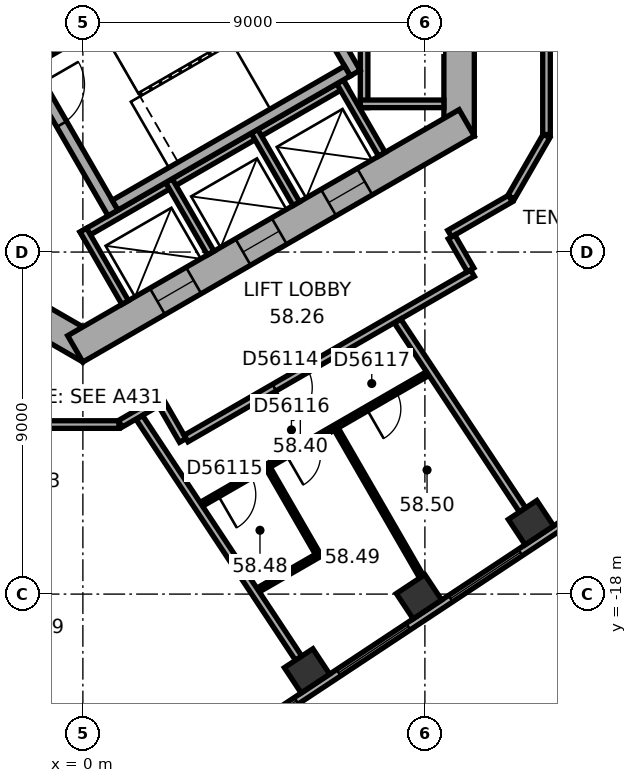
"""IFC4 building model, lengths in metres.
Left out: names, types, materials, properties, quantities, classifications, styles, units other than length and angle.
Written with IfcOpenShell. Run it as: python <this file> out.ifc"""

import sys

from ifc_helpers import new_model, si_unit, direction, frame, frame_2d, origin, origin_2d, place, context, subcontext, project, spatial, rectangle, extrude, element, fill, save


model = new_model("IFC4")
c1 = context("Model", 3, precision=1e-05, world=origin(), true_north=direction((0.0, 1.0)))
c2 = subcontext(c1, "Body", "Model", "MODEL_VIEW")
j1 = project(units=[si_unit("LENGTHUNIT", "METRE"), si_unit("PLANEANGLEUNIT", "RADIAN")], contexts=[c1])
p1 = place(None, origin())
s1 = spatial("IfcSite", under=j1, at=p1, CompositionType="ELEMENT")
p2 = place(p1, origin())
s2 = spatial("IfcBuilding", under=s1, at=p2, CompositionType="ELEMENT")
p3 = place(p2, frame((0.0, 0.0, 236.5)))
s3 = spatial("IfcBuildingStorey", under=s2, at=p3, CompositionType="ELEMENT", Elevation=236.5)
for number, where, z_axis, x_axis in (
    (1, (5.898, -20.021, 0.0), (0.0, 0.0, 1.0), (0.834, 0.552, 0.0)),
    (2, (8.844, -18.07, 0.0), (0.0, 0.0, 1.0), (0.834, 0.552, 0.0)),
    (3, (11.791, -16.12, 0.0), (0.0, 0.0, 1.0), (0.834, 0.552, 0.0)),
):
    element("IfcColumn", number, at=place(p3, frame(where, z_axis=z_axis, x_axis=x_axis)), inside=s3, PredefinedType="COLUMN", context=c2, shape_type="SweptSolid", body=[
        extrude(rectangle(XDim=0.9, YDim=0.8, at=origin_2d()), origin(), (0.0, 0.0, 1.0), 3.7),
    ])
p4 = place(p3, frame((9.9, -5.947, 0.0), z_axis=(0.0, 0.0, 1.0), x_axis=(0.0, 1.0, 0.0)))
e4 = element("IfcWall", 4, at=p4, inside=s3, PredefinedType="SHEAR", context=c2, shape_type="SweptSolid", body=[
    extrude(rectangle(XDim=11.894, YDim=0.8, at=frame_2d((5.947, 0.0))), origin(), (0.0, 0.0, 1.0), 3.7),
])
p5 = place(p4, frame((6.147, 0.0, 0.0)))
e5 = element("IfcOpeningElement", 5, at=p5, cuts=e4, PredefinedType="OPENING", context=c2, shape_type="SweptSolid", body=[
    extrude(rectangle(XDim=1.5, YDim=2.1, at=frame_2d((0.75, 1.05))), frame((0.0, 0.41, 0.0), z_axis=(0.0, -1.0, 0.0), x_axis=(1.0, 0.0, 0.0)), (0.0, 0.0, 1.0), 0.82),
])
p6 = place(p4, frame((2.997, 0.0, 0.0)))
e6 = element("IfcOpeningElement", 6, at=p6, cuts=e4, PredefinedType="OPENING", context=c2, shape_type="SweptSolid", body=[
    extrude(rectangle(XDim=0.9, YDim=2.1, at=frame_2d((0.45, 1.05))), frame((0.0, 0.41, 0.0), z_axis=(0.0, -1.0, 0.0), x_axis=(1.0, 0.0, 0.0)), (0.0, 0.0, 1.0), 0.82),
])
p7 = place(p3, frame((-10.1, -5.6, 0.0), z_axis=(0.0, 0.0, 1.0), x_axis=(0.866023897231, -0.500002609418, 0.0)))
e7 = element("IfcWall", 7, at=p7, inside=s3, PredefinedType="SHEAR", context=c2, shape_type="SweptSolid", body=[
    extrude(rectangle(XDim=11.894, YDim=0.8, at=frame_2d((5.947, 0.0))), origin(), (0.0, 0.0, 1.0), 3.7),
])
p8 = place(p7, frame((6.147, 0.0, 0.0)))
e8 = element("IfcOpeningElement", 8, at=p8, cuts=e7, PredefinedType="OPENING", context=c2, shape_type="SweptSolid", body=[
    extrude(rectangle(XDim=1.5, YDim=2.1, at=frame_2d((0.75, 1.05))), frame((0.0, 0.41, 0.0), z_axis=(0.0, -1.0, 0.0), x_axis=(1.0, 0.0, 0.0)), (0.0, 0.0, 1.0), 0.82),
])
p9 = place(p7, frame((1.597, 0.0, 0.0)))
e9 = element("IfcOpeningElement", 9, at=p9, cuts=e7, PredefinedType="OPENING", context=c2, shape_type="SweptSolid", body=[
    extrude(rectangle(XDim=1.1, YDim=2.1, at=frame_2d((0.55, 1.05))), frame((0.0, 0.41, 0.0), z_axis=(0.0, -1.0, 0.0), x_axis=(1.0, 0.0, 0.0)), (0.0, 0.0, 1.0), 0.82),
])
p10 = place(p7, frame((4.197, 0.0, 0.0)))
e10 = element("IfcOpeningElement", 10, at=p10, cuts=e7, PredefinedType="OPENING", context=c2, shape_type="SweptSolid", body=[
    extrude(rectangle(XDim=1.1, YDim=2.1, at=frame_2d((0.55, 1.05))), frame((0.0, 0.41, 0.0), z_axis=(0.0, -1.0, 0.0), x_axis=(1.0, 0.0, 0.0)), (0.0, 0.0, 1.0), 0.82),
])
p11 = place(p3, frame((-0.2, -11.547, 0.0), z_axis=(0.0, 0.0, 1.0), x_axis=(0.866023897231, 0.500002609418, 0.0)))
e11 = element("IfcWall", 11, at=p11, inside=s3, PredefinedType="SHEAR", context=c2, shape_type="SweptSolid", body=[
    extrude(rectangle(XDim=11.894, YDim=0.8, at=frame_2d((5.947, 0.0))), origin(), (0.0, 0.0, 1.0), 3.7),
])
p12 = place(p11, frame((2.497, 0.0, 0.0)))
e12 = element("IfcOpeningElement", 12, at=p12, cuts=e11, PredefinedType="OPENING", context=c2, shape_type="SweptSolid", body=[
    extrude(rectangle(XDim=1.1, YDim=2.1, at=frame_2d((0.55, 1.05))), frame((0.0, 0.41, 0.0), z_axis=(0.0, -1.0, 0.0), x_axis=(1.0, 0.0, 0.0)), (0.0, 0.0, 1.0), 0.82),
])
p13 = place(p11, frame((5.097, 0.0, 0.0)))
e13 = element("IfcOpeningElement", 13, at=p13, cuts=e11, PredefinedType="OPENING", context=c2, shape_type="SweptSolid", body=[
    extrude(rectangle(XDim=1.1, YDim=2.1, at=frame_2d((0.55, 1.05))), frame((0.0, 0.41, 0.0), z_axis=(0.0, -1.0, 0.0), x_axis=(1.0, 0.0, 0.0)), (0.0, 0.0, 1.0), 0.82),
])
p14 = place(p11, frame((7.697, 0.0, 0.0)))
e14 = element("IfcOpeningElement", 14, at=p14, cuts=e11, PredefinedType="OPENING", context=c2, shape_type="SweptSolid", body=[
    extrude(rectangle(XDim=1.1, YDim=2.1, at=frame_2d((0.55, 1.05))), frame((0.0, 0.41, 0.0), z_axis=(0.0, -1.0, 0.0), x_axis=(1.0, 0.0, 0.0)), (0.0, 0.0, 1.0), 0.82),
])
p15 = place(p3, frame((2.739, -22.711, 0.0), z_axis=(0.0, 0.0, 1.0), x_axis=(0.833885723098, 0.551937134838, 0.0)))
e15 = element("IfcWall", 15, at=p15, inside=s3, PredefinedType="STANDARD", context=c2, shape_type="SweptSolid", body=[
    extrude(rectangle(XDim=18.841, YDim=0.2, at=frame_2d((9.421, 0.0))), origin(), (0.0, 0.0, 1.0), 3.7),
])
p16 = place(p15, frame((1.252, 0.0, 0.9)))
e16 = element("IfcOpeningElement", 16, at=p16, cuts=e15, PredefinedType="OPENING", context=c2, shape_type="SweptSolid", body=[
    extrude(rectangle(XDim=2.2, YDim=2.0, at=frame_2d((1.1, 1.0))), frame((0.0, 0.11, 0.0), z_axis=(0.0, -1.0, 0.0), x_axis=(1.0, 0.0, 0.0)), (0.0, 0.0, 1.0), 0.22),
])
p17 = place(p15, frame((4.786, 0.0, 0.9)))
e17 = element("IfcOpeningElement", 17, at=p17, cuts=e15, PredefinedType="OPENING", context=c2, shape_type="SweptSolid", body=[
    extrude(rectangle(XDim=2.2, YDim=2.0, at=frame_2d((1.1, 1.0))), frame((0.0, 0.11, 0.0), z_axis=(0.0, -1.0, 0.0), x_axis=(1.0, 0.0, 0.0)), (0.0, 0.0, 1.0), 0.22),
])
p18 = place(p15, frame((8.32, 0.0, 0.9)))
e18 = element("IfcOpeningElement", 18, at=p18, cuts=e15, PredefinedType="OPENING", context=c2, shape_type="SweptSolid", body=[
    extrude(rectangle(XDim=2.2, YDim=2.0, at=frame_2d((1.1, 1.0))), frame((0.0, 0.11, 0.0), z_axis=(0.0, -1.0, 0.0), x_axis=(1.0, 0.0, 0.0)), (0.0, 0.0, 1.0), 0.22),
])
p19 = place(p15, frame((11.854, 0.0, 0.9)))
e19 = element("IfcOpeningElement", 19, at=p19, cuts=e15, PredefinedType="OPENING", context=c2, shape_type="SweptSolid", body=[
    extrude(rectangle(XDim=2.2, YDim=2.0, at=frame_2d((1.1, 1.0))), frame((0.0, 0.11, 0.0), z_axis=(0.0, -1.0, 0.0), x_axis=(1.0, 0.0, 0.0)), (0.0, 0.0, 1.0), 0.22),
])
p20 = place(p15, frame((15.387, 0.0, 0.9)))
e20 = element("IfcOpeningElement", 20, at=p20, cuts=e15, PredefinedType="OPENING", context=c2, shape_type="SweptSolid", body=[
    extrude(rectangle(XDim=2.2, YDim=2.0, at=frame_2d((1.1, 1.0))), frame((0.0, 0.11, 0.0), z_axis=(0.0, -1.0, 0.0), x_axis=(1.0, 0.0, 0.0)), (0.0, 0.0, 1.0), 0.22),
])
p21 = place(p3, frame((7.4, -5.2, 0.0), z_axis=(0.0, 0.0, 1.0), x_axis=(0.0, 1.0, 0.0)))
e21 = element("IfcWall", 21, at=p21, inside=s3, PredefinedType="PARTITIONING", context=c2, shape_type="SweptSolid", body=[
    extrude(rectangle(XDim=5.4, YDim=0.2, at=frame_2d((2.7, 0.0))), origin(), (0.0, 0.0, 1.0), 3.42),
])
p22 = place(p3, frame((7.3, -5.1, 0.0), z_axis=(0.0, 0.0, 1.0), x_axis=(1.0, 0.0, 0.0)))
e22 = element("IfcWall", 22, at=p22, inside=s3, PredefinedType="PARTITIONING", context=c2, shape_type="SweptSolid", body=[
    extrude(rectangle(XDim=2.2, YDim=0.2, at=frame_2d((1.1, 0.0))), origin(), (0.0, 0.0, 1.0), 3.42),
])
p23 = place(p3, frame((-0.024, -8.559, 0.0), z_axis=(0.0, 0.0, 1.0), x_axis=(0.866026010844, 0.49999894854, 0.0)))
e23 = element("IfcWall", 23, at=p23, inside=s3, PredefinedType="PARTITIONING", context=c2, shape_type="SweptSolid", body=[
    extrude(rectangle(XDim=8.0, YDim=0.2, at=frame_2d((4.0, 0.0))), origin(), (0.0, 0.0, 1.0), 3.42),
])
for number, where, z_axis, x_axis in (
    (24, (0.013, -8.422, 0.0), (0.0, 0.0, 1.0), (0.5, -0.866, 0.0)),
    (25, (2.264, -7.122, 0.0), (0.0, 0.0, 1.0), (0.5, -0.866, 0.0)),
    (26, (4.516, -5.822, 0.0), (0.0, 0.0, 1.0), (0.5, -0.866, 0.0)),
    (27, (6.768, -4.522, 0.0), (0.0, 0.0, 1.0), (0.5, -0.866, 0.0)),
):
    element("IfcWall", number, at=place(p3, frame(where, z_axis=z_axis, x_axis=x_axis)), inside=s3, PredefinedType="PARTITIONING", context=c2, shape_type="SweptSolid", body=[
        extrude(rectangle(XDim=2.2, YDim=0.2, at=frame_2d((1.1, 0.0))), origin(), (0.0, 0.0, 1.0), 3.42),
    ])
p24 = place(p3, frame((-1.558, -3.902, 0.0), z_axis=(0.0, 0.0, 1.0), x_axis=(0.499977259774, -0.866038532462, 0.0)))
e28 = element("IfcWall", 28, at=p24, inside=s3, PredefinedType="SHEAR", context=c2, shape_type="SweptSolid", body=[
    extrude(rectangle(XDim=4.7, YDim=0.3, at=frame_2d((2.35, 0.0))), origin(), (0.0, 0.0, 1.0), 3.42),
])
p25 = place(p24, frame((0.8, 0.0, 0.0)))
e29 = element("IfcOpeningElement", 29, at=p25, cuts=e28, PredefinedType="OPENING", context=c2, shape_type="SweptSolid", body=[
    extrude(rectangle(XDim=1.2, YDim=2.1, at=frame_2d((0.6, 1.05))), frame((0.0, 0.16, 0.0), z_axis=(0.0, -1.0, 0.0), x_axis=(1.0, 0.0, 0.0)), (0.0, 0.0, 1.0), 0.32),
])
p26 = place(p3, frame((4.816, -0.222, 0.0), z_axis=(0.0, 0.0, 1.0), x_axis=(0.499977259774, -0.866038532462, 0.0)))
e30 = element("IfcWall", 30, at=p26, inside=s3, PredefinedType="SHEAR", context=c2, shape_type="SweptSolid", body=[
    extrude(rectangle(XDim=4.7, YDim=0.3, at=frame_2d((2.35, 0.0))), origin(), (0.0, 0.0, 1.0), 3.42),
])
for number, where, z_axis, x_axis in (
    (31, (-1.353, -3.957, 0.0), (0.0, 0.0, 1.0), (0.866, 0.5, 0.0)),
    (32, (0.847, -7.767, 0.0), (0.0, 0.0, 1.0), (0.866, 0.5, 0.0)),
):
    element("IfcWall", number, at=place(p3, frame(where, z_axis=z_axis, x_axis=x_axis)), inside=s3, PredefinedType="SHEAR", context=c2, shape_type="SweptSolid", body=[
        extrude(rectangle(XDim=7.06, YDim=0.3, at=frame_2d((3.53, 0.0))), origin(), (0.0, 0.0, 1.0), 3.42),
    ])
p27 = place(p3, frame((-0.95, -13.539, 0.0), z_axis=(0.0, 0.0, 1.0), x_axis=(1.0, 0.0, 0.0)))
e33 = element("IfcWall", 33, at=p27, inside=s3, PredefinedType="PARTITIONING", context=c2, shape_type="SweptSolid", body=[
    extrude(rectangle(XDim=1.9, YDim=0.2, at=frame_2d((0.95, 0.0))), origin(), (0.0, 0.0, 1.0), 3.42),
])
p28 = place(p3, frame((0.985, -13.519, 0.0), z_axis=(0.0, 0.0, 1.0), x_axis=(0.866054082991, 0.499950322867, 0.0)))
e34 = element("IfcWall", 34, at=p28, inside=s3, PredefinedType="PARTITIONING", context=c2, shape_type="SweptSolid", body=[
    extrude(rectangle(XDim=1.206, YDim=0.2, at=frame_2d((0.603, 0.0))), origin(), (0.0, 0.0, 1.0), 3.42),
])
p29 = place(p3, frame((2.079, -13.003, 0.0), z_axis=(0.0, 0.0, 1.0), x_axis=(0.500074377092, -0.865982457891, 0.0)))
e35 = element("IfcWall", 35, at=p29, inside=s3, PredefinedType="PARTITIONING", context=c2, shape_type="SweptSolid", body=[
    extrude(rectangle(XDim=1.101, YDim=0.2, at=frame_2d((0.55, 0.0))), origin(), (0.0, 0.0, 1.0), 3.42),
])
p30 = place(p3, frame((2.716, -13.906, 0.0), z_axis=(0.0, 0.0, 1.0), x_axis=(0.866040290674, 0.499974214264, 0.0)))
e36 = element("IfcWall", 36, at=p30, inside=s3, PredefinedType="PARTITIONING", context=c2, shape_type="SweptSolid", body=[
    extrude(rectangle(XDim=8.702, YDim=0.2, at=frame_2d((4.351, 0.0))), origin(), (0.0, 0.0, 1.0), 3.42),
])
p31 = place(p30, frame((2.679, 0.0, 0.0)))
e37 = element("IfcOpeningElement", 37, at=p31, cuts=e36, PredefinedType="OPENING", context=c2, shape_type="SweptSolid", body=[
    extrude(rectangle(XDim=1.0, YDim=2.1, at=frame_2d((0.5, 1.05))), frame((0.0, 0.11, 0.0), z_axis=(0.0, -1.0, 0.0), x_axis=(1.0, 0.0, 0.0)), (0.0, 0.0, 1.0), 0.22),
])
p32 = place(p3, frame((3.117, -15.638, 0.0), z_axis=(0.0, 0.0, 1.0), x_axis=(0.866031365477, 0.499989673903, 0.0)))
e38 = element("IfcWall", 38, at=p32, inside=s3, PredefinedType="PARTITIONING", context=c2, shape_type="SweptSolid", body=[
    extrude(rectangle(XDim=6.881, YDim=0.12, at=frame_2d((3.44, 0.0))), origin(), (0.0, 0.0, 1.0), 3.42),
])
p33 = place(p32, frame((0.5, 0.0, 0.0)))
e39 = element("IfcOpeningElement", 39, at=p33, cuts=e38, PredefinedType="OPENING", context=c2, shape_type="SweptSolid", body=[
    extrude(rectangle(XDim=1.0, YDim=2.1, at=frame_2d((0.5, 1.05))), frame((0.0, 0.07, 0.0), z_axis=(0.0, -1.0, 0.0), x_axis=(1.0, 0.0, 0.0)), (0.0, 0.0, 1.0), 0.14),
])
p34 = place(p32, frame((2.583, 0.0, 0.0)))
e40 = element("IfcOpeningElement", 40, at=p34, cuts=e38, PredefinedType="OPENING", context=c2, shape_type="SweptSolid", body=[
    extrude(rectangle(XDim=0.9, YDim=2.1, at=frame_2d((0.45, 1.05))), frame((0.0, 0.07, 0.0), z_axis=(0.0, -1.0, 0.0), x_axis=(1.0, 0.0, 0.0)), (0.0, 0.0, 1.0), 0.14),
])
p35 = place(p32, frame((5.023, 0.0, 0.0)))
e41 = element("IfcOpeningElement", 41, at=p35, cuts=e38, PredefinedType="OPENING", context=c2, shape_type="SweptSolid", body=[
    extrude(rectangle(XDim=0.9, YDim=2.1, at=frame_2d((0.45, 1.05))), frame((0.0, 0.07, 0.0), z_axis=(0.0, -1.0, 0.0), x_axis=(1.0, 0.0, 0.0)), (0.0, 0.0, 1.0), 0.14),
])
p36 = place(p3, frame((4.61, -17.893, 0.0), z_axis=(0.0, 0.0, 1.0), x_axis=(0.866023842607, 0.500002704028, 0.0)))
e42 = element("IfcWall", 42, at=p36, inside=s3, PredefinedType="PARTITIONING", context=c2, shape_type="SweptSolid", body=[
    extrude(rectangle(XDim=1.835, YDim=0.12, at=frame_2d((0.917, 0.0))), origin(), (0.0, 0.0, 1.0), 3.42),
])
p37 = place(p3, frame((5.677, -19.687, 0.0), z_axis=(0.0, 0.0, 1.0), x_axis=(-0.551936619203, 0.833886064389, 0.0)))
e43 = element("IfcWall", 43, at=p37, inside=s3, PredefinedType="PARTITIONING", context=c2, shape_type="SweptSolid", body=[
    extrude(rectangle(XDim=7.592, YDim=0.2, at=frame_2d((3.796, 0.0))), origin(), (0.0, 0.0, 1.0), 3.42),
])
p38 = place(p3, frame((6.169, -16.924, 0.0), z_axis=(0.0, 0.0, 1.0), x_axis=(-0.500047388771, 0.865998042136, 0.0)))
e44 = element("IfcWall", 44, at=p38, inside=s3, PredefinedType="PARTITIONING", context=c2, shape_type="SweptSolid", body=[
    extrude(rectangle(XDim=2.58, YDim=0.12, at=frame_2d((1.29, 0.0))), origin(), (0.0, 0.0, 1.0), 3.42),
])
p39 = place(p3, frame((8.912, -17.545, 0.0), z_axis=(0.0, 0.0, 1.0), x_axis=(-0.500022113525, 0.866012636158, 0.0)))
e45 = element("IfcWall", 45, at=p39, inside=s3, PredefinedType="PARTITIONING", context=c2, shape_type="SweptSolid", body=[
    extrude(rectangle(XDim=4.49, YDim=0.12, at=frame_2d((2.245, 0.0))), origin(), (0.0, 0.0, 1.0), 2.87),
])
p40 = place(p3, frame((9.652, -8.515, 0.0), z_axis=(0.0, 0.0, 1.0), x_axis=(0.866020375458, 0.500008709215, 0.0)))
e46 = element("IfcWall", 46, at=p40, inside=s3, PredefinedType="PARTITIONING", context=c2, shape_type="SweptSolid", body=[
    extrude(rectangle(XDim=1.846, YDim=0.2, at=frame_2d((0.923, 0.0))), origin(), (0.0, 0.0, 1.0), 3.42),
])
p41 = place(p3, frame((10.202, -9.469, 0.0), z_axis=(0.0, 0.0, 1.0), x_axis=(-0.499968756647, 0.866043441391, 0.0)))
e47 = element("IfcWall", 47, at=p41, inside=s3, PredefinedType="PARTITIONING", context=c2, shape_type="SweptSolid", body=[
    extrude(rectangle(XDim=1.001, YDim=0.2, at=frame_2d((0.5, 0.0))), origin(), (0.0, 0.0, 1.0), 3.42),
])
p42 = place(p3, frame((11.27, -7.558, 0.0), z_axis=(0.0, 0.0, 1.0), x_axis=(0.499964847546, 0.866045698112, 0.0)))
e48 = element("IfcWall", 48, at=p42, inside=s3, PredefinedType="PARTITIONING", context=c2, shape_type="SweptSolid", body=[
    extrude(rectangle(XDim=1.86, YDim=0.2, at=frame_2d((0.93, 0.0))), origin(), (0.0, 0.0, 1.0), 3.42),
])
p43 = place(p3, frame((11.571, -15.786, 0.0), z_axis=(0.0, 0.0, 1.0), x_axis=(-0.551944861763, 0.833880608705, 0.0)))
e49 = element("IfcWall", 49, at=p43, inside=s3, PredefinedType="PARTITIONING", context=c2, shape_type="SweptSolid", body=[
    extrude(rectangle(XDim=5.957, YDim=0.2, at=frame_2d((2.979, 0.0))), origin(), (0.0, 0.0, 1.0), 3.42),
])
p44 = place(p3, frame((12.2, -5.907, 0.0), z_axis=(0.0, 0.0, 1.0), x_axis=(0.0, 1.0, 0.0)))
e50 = element("IfcWall", 50, at=p44, inside=s3, PredefinedType="PARTITIONING", context=c2, shape_type="SweptSolid", body=[
    extrude(rectangle(XDim=4.971, YDim=0.2, at=frame_2d((2.486, 0.0))), origin(), (0.0, 0.0, 1.0), 3.42),
])
p45 = place(p16, origin())
e51 = element("IfcWindow", 51, at=p45, inside=s3, PartitioningType="SINGLE_PANEL", PredefinedType="WINDOW", context=c2, shape_type="SweptSolid", body=[
    extrude(rectangle(XDim=2.2, YDim=2.0, at=frame_2d((1.1, 1.0))), frame((0.0, 0.03, 0.0), z_axis=(0.0, -1.0, 0.0), x_axis=(1.0, 0.0, 0.0)), (0.0, 0.0, 1.0), 0.06),
])
fill(e16, e51)
p46 = place(p17, origin())
e52 = element("IfcWindow", 52, at=p46, inside=s3, PartitioningType="SINGLE_PANEL", PredefinedType="WINDOW", context=c2, shape_type="SweptSolid", body=[
    extrude(rectangle(XDim=2.2, YDim=2.0, at=frame_2d((1.1, 1.0))), frame((0.0, 0.03, 0.0), z_axis=(0.0, -1.0, 0.0), x_axis=(1.0, 0.0, 0.0)), (0.0, 0.0, 1.0), 0.06),
])
fill(e17, e52)
p47 = place(p18, origin())
e53 = element("IfcWindow", 53, at=p47, inside=s3, PartitioningType="SINGLE_PANEL", PredefinedType="WINDOW", context=c2, shape_type="SweptSolid", body=[
    extrude(rectangle(XDim=2.2, YDim=2.0, at=frame_2d((1.1, 1.0))), frame((0.0, 0.03, 0.0), z_axis=(0.0, -1.0, 0.0), x_axis=(1.0, 0.0, 0.0)), (0.0, 0.0, 1.0), 0.06),
])
fill(e18, e53)
p48 = place(p25, origin())
e54 = element("IfcDoor", 54, at=p48, inside=s3, OperationType="SINGLE_SWING_RIGHT", PredefinedType="DOOR", context=c2, shape_type="SweptSolid", body=[
    extrude(rectangle(XDim=1.2, YDim=2.1, at=frame_2d((0.6, 1.05))), frame((0.0, 0.025, 0.0), z_axis=(0.0, -1.0, 0.0), x_axis=(1.0, 0.0, 0.0)), (0.0, 0.0, 1.0), 0.05),
])
fill(e29, e54)
p49 = place(p12, origin())
e55 = element("IfcDoor", 55, at=p49, inside=s3, OperationType="DOUBLE_DOOR_SLIDING", PredefinedType="DOOR", context=c2, shape_type="SweptSolid", body=[
    extrude(rectangle(XDim=1.1, YDim=2.1, at=frame_2d((0.55, 1.05))), frame((0.0, 0.025, 0.0), z_axis=(0.0, -1.0, 0.0), x_axis=(1.0, 0.0, 0.0)), (0.0, 0.0, 1.0), 0.05),
])
fill(e12, e55)
p50 = place(p13, origin())
e56 = element("IfcDoor", 56, at=p50, inside=s3, OperationType="DOUBLE_DOOR_SLIDING", PredefinedType="DOOR", context=c2, shape_type="SweptSolid", body=[
    extrude(rectangle(XDim=1.1, YDim=2.1, at=frame_2d((0.55, 1.05))), frame((0.0, 0.025, 0.0), z_axis=(0.0, -1.0, 0.0), x_axis=(1.0, 0.0, 0.0)), (0.0, 0.0, 1.0), 0.05),
])
fill(e13, e56)
p51 = place(p14, origin())
e57 = element("IfcDoor", 57, at=p51, inside=s3, OperationType="DOUBLE_DOOR_SLIDING", PredefinedType="DOOR", context=c2, shape_type="SweptSolid", body=[
    extrude(rectangle(XDim=1.1, YDim=2.1, at=frame_2d((0.55, 1.05))), frame((0.0, 0.025, 0.0), z_axis=(0.0, -1.0, 0.0), x_axis=(1.0, 0.0, 0.0)), (0.0, 0.0, 1.0), 0.05),
])
fill(e14, e57)
p52 = place(p31, origin())
e58 = element("IfcDoor", 58, at=p52, inside=s3, OperationType="SINGLE_SWING_LEFT", PredefinedType="DOOR", context=c2, shape_type="SweptSolid", body=[
    extrude(rectangle(XDim=1.0, YDim=2.1, at=frame_2d((0.5, 1.05))), frame((0.0, 0.025, 0.0), z_axis=(0.0, -1.0, 0.0), x_axis=(1.0, 0.0, 0.0)), (0.0, 0.0, 1.0), 0.05),
])
fill(e37, e58)
p53 = place(p33, origin())
e59 = element("IfcDoor", 59, at=p53, inside=s3, OperationType="SINGLE_SWING_LEFT", PredefinedType="DOOR", context=c2, shape_type="SweptSolid", body=[
    extrude(rectangle(XDim=1.0, YDim=2.1, at=frame_2d((0.5, 1.05))), frame((0.0, 0.025, 0.0), z_axis=(0.0, -1.0, 0.0), x_axis=(1.0, 0.0, 0.0)), (0.0, 0.0, 1.0), 0.05),
])
fill(e39, e59)
p54 = place(p34, origin())
e60 = element("IfcDoor", 60, at=p54, inside=s3, OperationType="SINGLE_SWING_LEFT", PredefinedType="DOOR", context=c2, shape_type="SweptSolid", body=[
    extrude(rectangle(XDim=0.9, YDim=2.1, at=frame_2d((0.45, 1.05))), frame((0.0, 0.025, 0.0), z_axis=(0.0, -1.0, 0.0), x_axis=(1.0, 0.0, 0.0)), (0.0, 0.0, 1.0), 0.05),
])
fill(e40, e60)
p55 = place(p35, origin())
e61 = element("IfcDoor", 61, at=p55, inside=s3, OperationType="SINGLE_SWING_LEFT", PredefinedType="DOOR", context=c2, shape_type="SweptSolid", body=[
    extrude(rectangle(XDim=0.9, YDim=2.1, at=frame_2d((0.45, 1.05))), frame((0.0, 0.025, 0.0), z_axis=(0.0, -1.0, 0.0), x_axis=(1.0, 0.0, 0.0)), (0.0, 0.0, 1.0), 0.05),
])
fill(e41, e61)
save(model, sys.argv[1])
